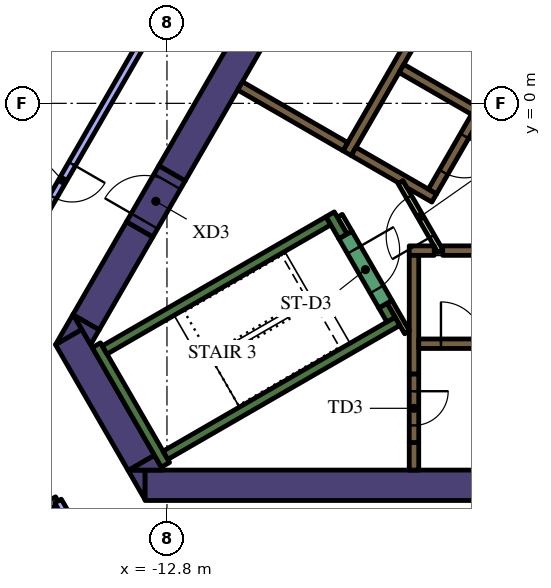
"""IFC4 building model, lengths in metres.
Left out: names, types, materials, properties, quantities, classifications, styles, units other than length and angle.
Written with IfcOpenShell. Run it as: python <this file> out.ifc"""

import sys

from ifc_helpers import new_model, si_unit, direction, frame, frame_2d, origin, place, context, subcontext, project, spatial, polyline, rectangle, outline, extrude, element, fill, save


model = new_model("IFC4")
c1 = context("Model", 3, precision=1e-05, world=origin(), true_north=direction((0.0, 1.0)))
c2 = subcontext(c1, "Body", "Model", "MODEL_VIEW")
j1 = project(units=[si_unit("LENGTHUNIT", "METRE"), si_unit("PLANEANGLEUNIT", "RADIAN")], contexts=[c1])
p1 = place(None, origin())
s1 = spatial("IfcSite", under=j1, at=p1, CompositionType="ELEMENT")
p2 = place(p1, origin())
s2 = spatial("IfcBuilding", under=s1, at=p2, CompositionType="ELEMENT")
p3 = place(p2, frame((0.0, 0.0, 158.4)))
s3 = spatial("IfcBuildingStorey", under=s2, at=p3, CompositionType="ELEMENT", Elevation=158.4)
p4 = place(p3, frame((-13.378, -10.05, 0.0), z_axis=(0.0, 0.0, 1.0), x_axis=(1.0, 0.0, 0.0)))
e1 = element("IfcWall", 1, at=p4, inside=s3, PredefinedType="SOLIDWALL", context=c2, shape_type="SweptSolid", body=[
    extrude(rectangle(XDim=22.282, YDim=0.8, at=frame_2d((11.141, 0.0))), origin(), (0.0, 0.0, 1.0), 4.2),
])
p5 = place(p3, origin())
e2 = element("IfcWall", 2, at=p5, inside=s3, PredefinedType="SOLIDWALL", context=c2, shape_type="SweptSolid", body=[
    extrude(outline(polyline([(-13.828, -9.65), (-13.38, -9.65), (-13.38, -10.426), (-13.828, -9.65)])), origin(), (0.0, 0.0, 1.0), 4.2),
])
p6 = place(p3, frame((-15.387, -6.148, 0.0), z_axis=(0.0, 0.0, 1.0), x_axis=(0.499984020225, -0.866034629516, 0.0)))
e3 = element("IfcWall", 3, at=p6, inside=s3, PredefinedType="SOLIDWALL", context=c2, shape_type="SweptSolid", body=[
    extrude(rectangle(XDim=3.824, YDim=0.8, at=frame_2d((1.912, 0.0))), origin(), (0.0, 0.0, 1.0), 4.2),
])
e4 = element("IfcWall", 4, at=p5, inside=s3, PredefinedType="SOLIDWALL", context=c2, shape_type="SweptSolid", body=[
    extrude(outline(polyline([(-15.042, -5.947), (-15.729, -6.343), (-15.271, -5.55), (-15.042, -5.947)])), origin(), (0.0, 0.0, 1.0), 4.2),
])
e5 = element("IfcWall", 5, at=p5, inside=s3, PredefinedType="SOLIDWALL", context=c2, shape_type="SweptSolid", body=[
    extrude(outline(polyline([(-12.904, -9.65), (-13.8, -9.65), (-13.128, -9.262), (-12.904, -9.65)])), origin(), (0.0, 0.0, 1.0), 4.2),
])
p7 = place(p3, frame((-13.518, -3.314, 0.0), z_axis=(0.0, 0.0, 1.0), x_axis=(-0.499969377405, -0.866043083026, 0.0)))
e6 = element("IfcWall", 6, at=p7, inside=s3, PredefinedType="SOLIDWALL", context=c2, shape_type="SweptSolid", body=[
    extrude(rectangle(XDim=2.824, YDim=0.8, at=frame_2d((1.412, 0.0))), origin(), (0.0, 0.0, 1.0), 4.2),
])
e7 = element("IfcWall", 7, at=p5, inside=s3, PredefinedType="SOLIDWALL", context=c2, shape_type="SweptSolid", body=[
    extrude(outline(polyline([(-14.809, -6.35), (-15.257, -5.574), (-14.585, -5.962), (-14.809, -6.35)])), origin(), (0.0, 0.0, 1.0), 4.2),
])
p8 = place(p3, frame((-12.668, -1.842, 0.0), z_axis=(0.0, 0.0, 1.0), x_axis=(0.500003640647, 0.866023301845, 0.0)))
e8 = element("IfcWall", 8, at=p8, inside=s3, PredefinedType="SOLIDWALL", context=c2, shape_type="SweptSolid", body=[
    extrude(rectangle(XDim=15.858, YDim=0.8, at=frame_2d((7.929, 0.0))), origin(), (0.0, 0.0, 1.0), 4.2),
])
p9 = place(p3, frame((-12.84, -9.511, 0.0), z_axis=(0.0, 0.0, 1.0), x_axis=(-0.499997733992, 0.866026712061, 0.0)))
e9 = element("IfcWall", 9, at=p9, inside=s3, PredefinedType="SOLIDWALL", context=c2, shape_type="SweptSolid", body=[
    extrude(rectangle(XDim=3.634, YDim=0.25, at=frame_2d((1.817, 0.0))), origin(), (0.0, 0.0, 1.0), 4.2),
])
p10 = place(p3, frame((-14.44, -6.49, 0.0), z_axis=(0.0, 0.0, 1.0), x_axis=(0.866022966069, 0.500004222222, 0.0)))
e10 = element("IfcWall", 10, at=p10, inside=s3, PredefinedType="SOLIDWALL", context=c2, shape_type="SweptSolid", body=[
    extrude(rectangle(XDim=6.8, YDim=0.25, at=frame_2d((3.4, 0.0))), origin(), (0.0, 0.0, 1.0), 4.2),
])
p11 = place(p3, frame((-8.168, -3.503, 0.0), z_axis=(0.0, 0.0, 1.0), x_axis=(-0.499952099219, 0.866053057547, 0.0)))
e11 = element("IfcWall", 11, at=p11, inside=s3, PredefinedType="SOLIDWALL", context=c2, shape_type="SweptSolid", body=[
    extrude(rectangle(XDim=0.675, YDim=0.25, at=frame_2d((0.337, 0.0))), origin(), (0.0, 0.0, 1.0), 4.2),
])
p12 = place(p3, frame((-12.84, -9.261, 0.0), z_axis=(0.0, 0.0, 1.0), x_axis=(0.866016039709, 0.500016218704, 0.0)))
e12 = element("IfcWall", 12, at=p12, inside=s3, PredefinedType="SOLIDWALL", context=c2, shape_type="SweptSolid", body=[
    extrude(rectangle(XDim=7.05, YDim=0.25, at=frame_2d((3.525, 0.0))), origin(), (0.0, 0.0, 1.0), 4.2),
])
p13 = place(p3, frame((-6.905, -5.69, 0.0), z_axis=(0.0, 0.0, 1.0), x_axis=(-0.500402024738, 0.865793170242, 0.0)))
e13 = element("IfcWall", 13, at=p13, inside=s3, PredefinedType="SOLIDWALL", context=c2, shape_type="SweptSolid", body=[
    extrude(rectangle(XDim=0.425, YDim=0.25, at=frame_2d((0.212, 0.0))), origin(), (0.0, 0.0, 1.0), 4.2),
])
p14 = place(p3, frame((-6.3, -8.925, 0.0), z_axis=(0.0, 0.0, 1.0), x_axis=(0.0, -1.0, 0.0)))
e14 = element("IfcWall", 14, at=p14, inside=s3, PredefinedType="SOLIDWALL", context=c2, shape_type="SweptSolid", body=[
    extrude(rectangle(XDim=0.725, YDim=0.25, at=frame_2d((0.363, 0.0))), origin(), (0.0, 0.0, 1.0), 4.2),
])
p15 = place(p3, frame((-5.545, -3.875, 0.0), z_axis=(0.0, 0.0, 1.0), x_axis=(1.0, 0.0, 0.0)))
e15 = element("IfcWall", 15, at=p15, inside=s3, PredefinedType="SOLIDWALL", context=c2, shape_type="SweptSolid", body=[
    extrude(rectangle(XDim=11.97, YDim=0.25, at=frame_2d((5.985, 0.0))), origin(), (0.0, 0.0, 1.0), 4.2),
])
p16 = place(p3, frame((-6.425, -3.875, 0.0), z_axis=(0.0, 0.0, 1.0), x_axis=(1.0, 0.0, 0.0)))
e16 = element("IfcWall", 16, at=p16, inside=s3, PredefinedType="SOLIDWALL", context=c2, shape_type="SweptSolid", body=[
    extrude(rectangle(XDim=0.658, YDim=0.25, at=frame_2d((0.329, 0.0))), origin(), (0.0, 0.0, 1.0), 4.2),
])
p17 = place(p3, frame((-6.3, -7.125, 0.0), z_axis=(0.0, 0.0, 1.0), x_axis=(0.0, 1.0, 0.0)))
e17 = element("IfcWall", 17, at=p17, inside=s3, PredefinedType="SOLIDWALL", context=c2, shape_type="SweptSolid", body=[
    extrude(rectangle(XDim=3.125, YDim=0.25, at=frame_2d((1.562, 0.0))), origin(), (0.0, 0.0, 1.0), 4.2),
])
p18 = place(p3, frame((-8.06, -1.311, 0.0), z_axis=(0.0, 0.0, 1.0), x_axis=(0.50000273126, 0.866023826885, 0.0)))
e18 = element("IfcWall", 18, at=p18, inside=s3, PredefinedType="SOLIDWALL", context=c2, shape_type="SweptSolid", body=[
    extrude(rectangle(XDim=10.33, YDim=0.25, at=frame_2d((5.165, 0.0))), origin(), (0.0, 0.0, 1.0), 4.2),
])
p19 = place(p3, frame((-4.724, -0.182, 0.0), z_axis=(0.0, 0.0, 1.0), x_axis=(-0.866008176907, 0.50002983664, 0.0)))
e19 = element("IfcWall", 19, at=p19, inside=s3, PredefinedType="SOLIDWALL", context=c2, shape_type="SweptSolid", body=[
    extrude(rectangle(XDim=2.2, YDim=0.25, at=frame_2d((1.1, 0.0))), origin(), (0.0, 0.0, 1.0), 4.2),
])
e20 = element("IfcWall", 20, at=p5, inside=s3, PredefinedType="SOLIDWALL", context=c2, shape_type="SweptSolid", body=[
    extrude(outline(polyline([(-5.922, -2.257), (-5.922, -2.257), (-5.705, -2.382), (-5.83, -2.598), (-6.483, -2.221), (-6.591, -2.033), (-6.591, -2.033), (-6.7, -2.096), (-7.952, -1.373), (-7.827, -1.156), (-5.922, -2.257)])), origin(), (0.0, 0.0, 1.0), 4.2),
])
p20 = place(p3, frame((-8.106, -1.14, 0.0), z_axis=(0.0, 0.0, 1.0), x_axis=(-0.866008981251, 0.500028443584, 0.0)))
e21 = element("IfcWall", 21, at=p20, inside=s3, PredefinedType="SOLIDWALL", context=c2, shape_type="SweptSolid", body=[
    extrude(rectangle(XDim=3.2, YDim=0.25, at=frame_2d((1.6, 0.0))), origin(), (0.0, 0.0, 1.0), 4.2),
])
p21 = place(p3, frame((-8.252, -2.958, 0.0), z_axis=(0.0, 0.0, 1.0), x_axis=(0.500174715838, -0.865924508047, 0.0)))
e22 = element("IfcWall", 22, at=p21, inside=s3, PredefinedType="PARTITIONING", context=c2, shape_type="SweptSolid", body=[
    extrude(rectangle(XDim=0.514, YDim=0.15, at=frame_2d((0.257, 0.0))), origin(), (0.0, 0.0, 1.0), 3.15),
])
p22 = place(p3, frame((-6.48, -6.027, 0.0), z_axis=(0.0, 0.0, 1.0), x_axis=(-0.499927229454, 0.866067413802, 0.0)))
e23 = element("IfcWall", 23, at=p22, inside=s3, PredefinedType="PARTITIONING", context=c2, shape_type="SweptSolid", body=[
    extrude(rectangle(XDim=0.929, YDim=0.15, at=frame_2d((0.464, 0.0))), origin(), (0.0, 0.0, 1.0), 4.2),
])
p23 = place(p3, frame((-6.175, -6.325, 0.0), z_axis=(0.0, 0.0, 1.0), x_axis=(1.0, 0.0, 0.0)))
e24 = element("IfcWall", 24, at=p23, inside=s3, PredefinedType="SOLIDWALL", context=c2, shape_type="SweptSolid", body=[
    extrude(rectangle(XDim=12.35, YDim=0.25, at=frame_2d((6.175, 0.0))), origin(), (0.0, 0.0, 1.0), 4.2),
])
p24 = place(p23, frame((0.585, 0.0, 0.0)))
e25 = element("IfcOpeningElement", 25, at=p24, cuts=e24, PredefinedType="OPENING", context=c2, shape_type="SweptSolid", body=[
    extrude(rectangle(XDim=1.1, YDim=2.1, at=frame_2d((0.55, 1.05))), frame((0.0, 0.135, 0.0), z_axis=(0.0, -1.0, 0.0), x_axis=(1.0, 0.0, 0.0)), (0.0, 0.0, 1.0), 0.27),
])
p25 = place(p23, frame((3.105, 0.0, 0.0)))
e26 = element("IfcOpeningElement", 26, at=p25, cuts=e24, PredefinedType="OPENING", context=c2, shape_type="SweptSolid", body=[
    extrude(rectangle(XDim=1.1, YDim=2.1, at=frame_2d((0.55, 1.05))), frame((0.0, 0.135, 0.0), z_axis=(0.0, -1.0, 0.0), x_axis=(1.0, 0.0, 0.0)), (0.0, 0.0, 1.0), 0.27),
])
p26 = place(p23, frame((5.625, 0.0, 0.0)))
e27 = element("IfcOpeningElement", 27, at=p26, cuts=e24, PredefinedType="OPENING", context=c2, shape_type="SweptSolid", body=[
    extrude(rectangle(XDim=1.1, YDim=2.1, at=frame_2d((0.55, 1.05))), frame((0.0, 0.135, 0.0), z_axis=(0.0, -1.0, 0.0), x_axis=(1.0, 0.0, 0.0)), (0.0, 0.0, 1.0), 0.27),
])
p27 = place(p23, frame((8.145, 0.0, 0.0)))
e28 = element("IfcOpeningElement", 28, at=p27, cuts=e24, PredefinedType="OPENING", context=c2, shape_type="SweptSolid", body=[
    extrude(rectangle(XDim=1.1, YDim=2.1, at=frame_2d((0.55, 1.05))), frame((0.0, 0.135, 0.0), z_axis=(0.0, -1.0, 0.0), x_axis=(1.0, 0.0, 0.0)), (0.0, 0.0, 1.0), 0.27),
])
p28 = place(p23, frame((10.665, 0.0, 0.0)))
e29 = element("IfcOpeningElement", 29, at=p28, cuts=e24, PredefinedType="OPENING", context=c2, shape_type="SweptSolid", body=[
    extrude(rectangle(XDim=1.1, YDim=2.1, at=frame_2d((0.55, 1.05))), frame((0.0, 0.135, 0.0), z_axis=(0.0, -1.0, 0.0), x_axis=(1.0, 0.0, 0.0)), (0.0, 0.0, 1.0), 0.27),
])
p29 = place(p3, frame((-0.898, 6.194, 0.0), z_axis=(0.0, 0.0, 1.0), x_axis=(-0.499996202215, -0.866027596426, 0.0)))
e30 = element("IfcWall", 30, at=p29, inside=s3, PredefinedType="SOLIDWALL", context=c2, shape_type="SweptSolid", body=[
    extrude(rectangle(XDim=9.83, YDim=0.25, at=frame_2d((4.915, 0.0))), origin(), (0.0, 0.0, 1.0), 4.2),
])
p30 = place(p29, frame((0.585, 0.0, 0.0)))
e31 = element("IfcOpeningElement", 31, at=p30, cuts=e30, PredefinedType="OPENING", context=c2, shape_type="SweptSolid", body=[
    extrude(rectangle(XDim=1.1, YDim=2.1, at=frame_2d((0.55, 1.05))), frame((0.0, 0.135, 0.0), z_axis=(0.0, -1.0, 0.0), x_axis=(1.0, 0.0, 0.0)), (0.0, 0.0, 1.0), 0.27),
])
p31 = place(p29, frame((3.105, 0.0, 0.0)))
e32 = element("IfcOpeningElement", 32, at=p31, cuts=e30, PredefinedType="OPENING", context=c2, shape_type="SweptSolid", body=[
    extrude(rectangle(XDim=1.1, YDim=2.1, at=frame_2d((0.55, 1.05))), frame((0.0, 0.135, 0.0), z_axis=(0.0, -1.0, 0.0), x_axis=(1.0, 0.0, 0.0)), (0.0, 0.0, 1.0), 0.27),
])
p32 = place(p29, frame((5.625, 0.0, 0.0)))
e33 = element("IfcOpeningElement", 33, at=p32, cuts=e30, PredefinedType="OPENING", context=c2, shape_type="SweptSolid", body=[
    extrude(rectangle(XDim=1.1, YDim=2.1, at=frame_2d((0.55, 1.05))), frame((0.0, 0.135, 0.0), z_axis=(0.0, -1.0, 0.0), x_axis=(1.0, 0.0, 0.0)), (0.0, 0.0, 1.0), 0.27),
])
p33 = place(p29, frame((8.145, 0.0, 0.0)))
e34 = element("IfcOpeningElement", 34, at=p33, cuts=e30, PredefinedType="OPENING", context=c2, shape_type="SweptSolid", body=[
    extrude(rectangle(XDim=1.1, YDim=2.1, at=frame_2d((0.55, 1.05))), frame((0.0, 0.135, 0.0), z_axis=(0.0, -1.0, 0.0), x_axis=(1.0, 0.0, 0.0)), (0.0, 0.0, 1.0), 0.27),
])
p34 = place(p3, frame((-8.103, -3.466, 0.0), z_axis=(0.0, 0.0, 1.0), x_axis=(0.500078061341, -0.865980330357, 0.0)))
e35 = element("IfcWall", 35, at=p34, inside=s3, PredefinedType="SOLIDWALL", context=c2, shape_type="SweptSolid", body=[
    extrude(rectangle(XDim=2.1, YDim=0.4, at=frame_2d((1.05, 0.0))), origin(), (0.0, 0.0, 1.0), 4.2),
])
p35 = place(p34, frame((0.45, 0.0, 0.0)))
e36 = element("IfcOpeningElement", 36, at=p35, cuts=e35, PredefinedType="OPENING", context=c2, shape_type="SweptSolid", body=[
    extrude(rectangle(XDim=1.2, YDim=2.1, at=frame_2d((0.6, 1.05))), frame((0.0, 0.21, 0.0), z_axis=(0.0, -1.0, 0.0), x_axis=(1.0, 0.0, 0.0)), (0.0, 0.0, 1.0), 0.42),
])
p36 = place(p3, frame((-6.3, -7.125, 0.0), z_axis=(0.0, 0.0, 1.0), x_axis=(0.0, -1.0, 0.0)))
e37 = element("IfcWall", 37, at=p36, inside=s3, PredefinedType="SOLIDWALL", context=c2, shape_type="SweptSolid", body=[
    extrude(rectangle(XDim=1.8, YDim=0.25, at=frame_2d((0.9, 0.0))), origin(), (0.0, 0.0, 1.0), 4.2),
])
p37 = place(p36, frame((0.45, 0.0, 0.0)))
e38 = element("IfcOpeningElement", 38, at=p37, cuts=e37, PredefinedType="OPENING", context=c2, shape_type="SweptSolid", body=[
    extrude(rectangle(XDim=0.9, YDim=2.1, at=frame_2d((0.45, 1.05))), frame((0.0, 0.135, 0.0), z_axis=(0.0, -1.0, 0.0), x_axis=(1.0, 0.0, 0.0)), (0.0, 0.0, 1.0), 0.27),
])
p38 = place(p3, frame((-5.606, -3.89, 0.0), z_axis=(0.0, 0.0, 1.0), x_axis=(-0.500027713859, 0.866009402589, 0.0)))
e39 = element("IfcWall", 39, at=p38, inside=s3, PredefinedType="PARTITIONING", context=c2, shape_type="SweptSolid", body=[
    extrude(rectangle(XDim=2.1, YDim=0.15, at=frame_2d((1.05, 0.0))), origin(), (0.0, 0.0, 1.0), 3.15),
])
p39 = place(p38, frame((0.45, 0.0, 0.0)))
e40 = element("IfcOpeningElement", 40, at=p39, cuts=e39, PredefinedType="OPENING", context=c2, shape_type="SweptSolid", body=[
    extrude(rectangle(XDim=1.2, YDim=2.1, at=frame_2d((0.6, 1.05))), frame((0.0, 0.085, 0.0), z_axis=(0.0, -1.0, 0.0), x_axis=(1.0, 0.0, 0.0)), (0.0, 0.0, 1.0), 0.17),
])
p40 = place(p3, frame((-13.518, -3.314, 0.0), z_axis=(0.0, 0.0, 1.0), x_axis=(0.500062241894, 0.865989465428, 0.0)))
e41 = element("IfcWall", 41, at=p40, inside=s3, PredefinedType="SOLIDWALL", context=c2, shape_type="SweptSolid", body=[
    extrude(rectangle(XDim=1.7, YDim=0.8, at=frame_2d((0.85, 0.0))), origin(), (0.0, 0.0, 1.0), 4.2),
])
p41 = place(p40, frame((0.25, 0.0, 0.0)))
e42 = element("IfcOpeningElement", 42, at=p41, cuts=e41, PredefinedType="OPENING", context=c2, shape_type="SweptSolid", body=[
    extrude(rectangle(XDim=1.2, YDim=2.1, at=frame_2d((0.6, 1.05))), frame((0.0, 0.41, 0.0), z_axis=(0.0, -1.0, 0.0), x_axis=(1.0, 0.0, 0.0)), (0.0, 0.0, 1.0), 0.82),
])
p42 = place(p3, frame((-13.047, 2.302, 0.0), z_axis=(0.0, 0.0, 1.0), x_axis=(-0.499986873641, -0.866032982159, 0.0)))
e43 = element("IfcWall", 43, at=p42, inside=s3, PredefinedType="PARTITIONING", context=c2, shape_type="SweptSolid", body=[
    extrude(rectangle(XDim=9.99, YDim=0.2, at=frame_2d((4.995, 0.0))), origin(), (0.0, 0.0, 1.0), 3.15),
])
p43 = place(p42, frame((4.5, 0.0, 0.0)))
e44 = element("IfcOpeningElement", 44, at=p43, cuts=e43, PredefinedType="OPENING", context=c2, shape_type="SweptSolid", body=[
    extrude(rectangle(XDim=1.0, YDim=2.1, at=frame_2d((0.5, 1.05))), frame((0.0, 0.11, 0.0), z_axis=(0.0, -1.0, 0.0), x_axis=(1.0, 0.0, 0.0)), (0.0, 0.0, 1.0), 0.22),
])
p44 = place(p3, frame((-20.851, -13.424, 0.0), z_axis=(0.0, 0.0, 1.0), x_axis=(0.866007151214, 0.500031613047, 0.0)))
e45 = element("IfcWall", 45, at=p44, inside=s3, PredefinedType="PARTITIONING", context=c2, shape_type="SweptSolid", body=[
    extrude(rectangle(XDim=5.97, YDim=0.2, at=frame_2d((2.985, 0.0))), origin(), (0.0, 0.0, 1.0), 3.15),
])
p45 = place(p3, frame((-15.666, -10.465, 0.0), z_axis=(0.0, 0.0, 1.0), x_axis=(0.499977443261, -0.866038426532, 0.0)))
e46 = element("IfcWall", 46, at=p45, inside=s3, PredefinedType="PARTITIONING", context=c2, shape_type="SweptSolid", body=[
    extrude(rectangle(XDim=2.155, YDim=0.2, at=frame_2d((1.077, 0.0))), origin(), (0.0, 0.0, 1.0), 3.15),
])
p46 = place(p24, origin())
e47 = element("IfcDoor", 47, at=p46, inside=s3, OperationType="DOUBLE_DOOR_SLIDING", PredefinedType="DOOR", context=c2, shape_type="SweptSolid", body=[
    extrude(rectangle(XDim=1.1, YDim=2.1, at=frame_2d((0.55, 1.05))), frame((0.0, 0.025, 0.0), z_axis=(0.0, -1.0, 0.0), x_axis=(1.0, 0.0, 0.0)), (0.0, 0.0, 1.0), 0.05),
])
fill(e25, e47)
p47 = place(p33, origin())
e48 = element("IfcDoor", 48, at=p47, inside=s3, OperationType="DOUBLE_DOOR_SLIDING", PredefinedType="DOOR", context=c2, shape_type="SweptSolid", body=[
    extrude(rectangle(XDim=1.1, YDim=2.1, at=frame_2d((0.55, 1.05))), frame((0.0, 0.025, 0.0), z_axis=(0.0, -1.0, 0.0), x_axis=(1.0, 0.0, 0.0)), (0.0, 0.0, 1.0), 0.05),
])
fill(e34, e48)
p48 = place(p35, origin())
e49 = element("IfcDoor", 49, at=p48, inside=s3, OperationType="SINGLE_SWING_LEFT", PredefinedType="DOOR", context=c2, shape_type="SweptSolid", body=[
    extrude(rectangle(XDim=1.2, YDim=2.1, at=frame_2d((0.6, 1.05))), frame((0.0, 0.025, 0.0), z_axis=(0.0, -1.0, 0.0), x_axis=(1.0, 0.0, 0.0)), (0.0, 0.0, 1.0), 0.05),
])
fill(e36, e49)
p49 = place(p37, origin())
e50 = element("IfcDoor", 50, at=p49, inside=s3, OperationType="SINGLE_SWING_LEFT", PredefinedType="DOOR", context=c2, shape_type="SweptSolid", body=[
    extrude(rectangle(XDim=0.9, YDim=2.1, at=frame_2d((0.45, 1.05))), frame((0.0, 0.025, 0.0), z_axis=(0.0, -1.0, 0.0), x_axis=(1.0, 0.0, 0.0)), (0.0, 0.0, 1.0), 0.05),
])
fill(e38, e50)
p50 = place(p39, origin())
e51 = element("IfcDoor", 51, at=p50, inside=s3, OperationType="SINGLE_SWING_LEFT", PredefinedType="DOOR", context=c2, shape_type="SweptSolid", body=[
    extrude(rectangle(XDim=1.2, YDim=2.1, at=frame_2d((0.6, 1.05))), frame((0.0, 0.025, 0.0), z_axis=(0.0, -1.0, 0.0), x_axis=(1.0, 0.0, 0.0)), (0.0, 0.0, 1.0), 0.05),
])
fill(e40, e51)
p51 = place(p41, origin())
e52 = element("IfcDoor", 52, at=p51, inside=s3, OperationType="SINGLE_SWING_LEFT", PredefinedType="DOOR", context=c2, shape_type="SweptSolid", body=[
    extrude(rectangle(XDim=1.2, YDim=2.1, at=frame_2d((0.6, 1.05))), frame((0.0, 0.025, 0.0), z_axis=(0.0, -1.0, 0.0), x_axis=(1.0, 0.0, 0.0)), (0.0, 0.0, 1.0), 0.05),
])
fill(e42, e52)
p52 = place(p43, origin())
e53 = element("IfcDoor", 53, at=p52, inside=s3, OperationType="SINGLE_SWING_RIGHT", PredefinedType="DOOR", context=c2, shape_type="SweptSolid", body=[
    extrude(rectangle(XDim=1.0, YDim=2.1, at=frame_2d((0.5, 1.05))), frame((0.0, 0.025, 0.0), z_axis=(0.0, -1.0, 0.0), x_axis=(1.0, 0.0, 0.0)), (0.0, 0.0, 1.0), 0.05),
])
fill(e44, e53)
save(model, sys.argv[1])
